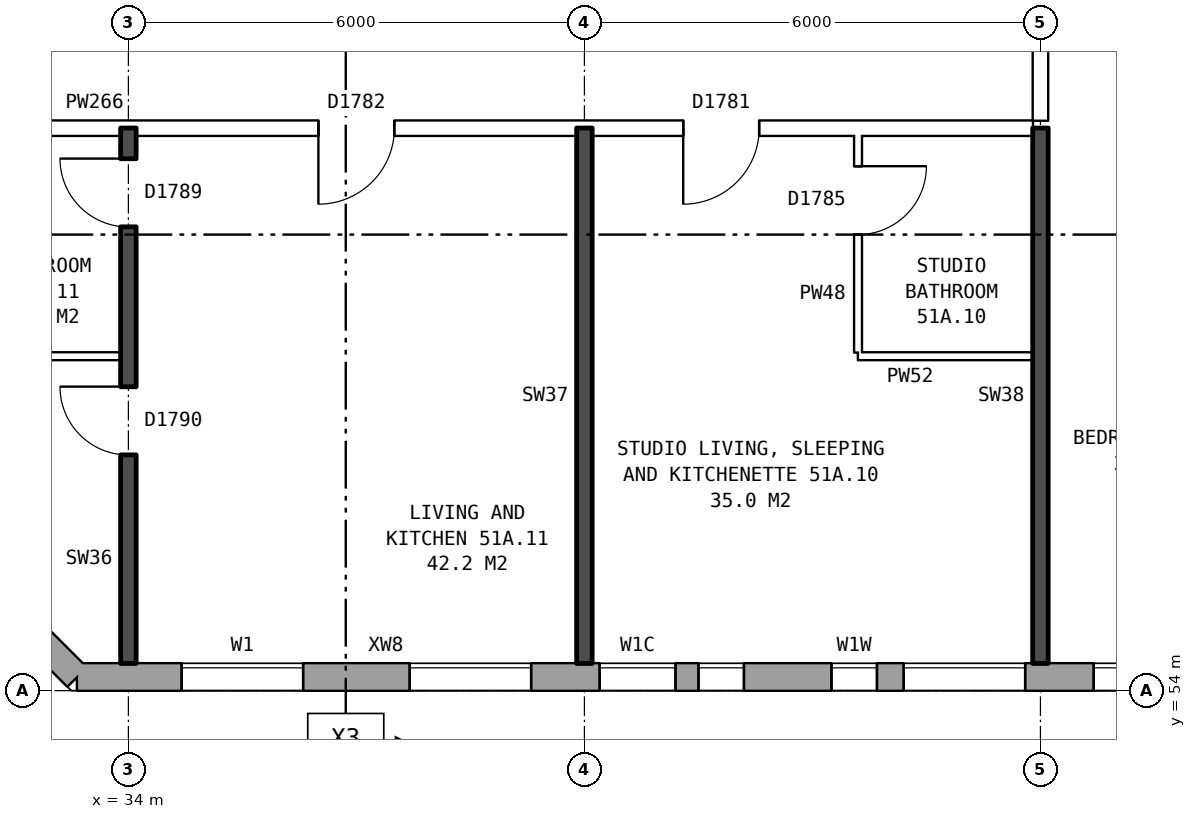
"""IFC4 building model, lengths in metres.
Left out: names, types, materials, properties, quantities, classifications, styles, units other than length and angle.
Written with IfcOpenShell. Run it as: python <this file> out.ifc"""

import sys

from ifc_helpers import new_model, si_unit, direction, frame, frame_2d, origin, place, context, subcontext, project, spatial, rectangle, extrude, element, fill, save


model = new_model("IFC4")
c1 = context("Model", 3, precision=1e-05, world=origin(), true_north=direction((0.0, 1.0)))
c2 = subcontext(c1, "Body", "Model", "MODEL_VIEW")
j1 = project(units=[si_unit("LENGTHUNIT", "METRE"), si_unit("PLANEANGLEUNIT", "RADIAN")], contexts=[c1])
p1 = place(None, origin())
s1 = spatial("IfcSite", under=j1, at=p1, CompositionType="ELEMENT")
p2 = place(p1, origin())
s2 = spatial("IfcBuilding", under=s1, at=p2, CompositionType="ELEMENT")
p3 = place(p2, frame((0.0, 0.0, 182.0)))
s3 = spatial("IfcBuildingStorey", under=s2, at=p3, CompositionType="ELEMENT", Elevation=182.0)
p4 = place(p3, frame((30.43, 57.075, 0.0), z_axis=(0.0, 0.0, 1.0), x_axis=(0.707106781187, -0.707106781187, 0.0)))
e1 = element("IfcWall", 1, at=p4, inside=s3, PredefinedType="STANDARD", context=c2, shape_type="SweptSolid", body=[
    extrude(rectangle(XDim=4.094, YDim=0.36, at=frame_2d((2.047, 0.0))), origin(), (0.0, 0.0, 1.0), 2.85),
])
p5 = place(p4, frame((1.247, 0.0, 0.8)))
e2 = element("IfcOpeningElement", 2, at=p5, cuts=e1, PredefinedType="OPENING", context=c2, shape_type="SweptSolid", body=[
    extrude(rectangle(XDim=1.6, YDim=1.8, at=frame_2d((0.8, 0.9))), frame((0.0, 0.19, 0.0), z_axis=(0.0, -1.0, 0.0), x_axis=(1.0, 0.0, 0.0)), (0.0, 0.0, 1.0), 0.38),
])
p6 = place(p3, frame((33.325, 54.18, 0.0), z_axis=(0.0, 0.0, 1.0), x_axis=(1.0, 0.0, 0.0)))
e3 = element("IfcWall", 3, at=p6, inside=s3, PredefinedType="STANDARD", context=c2, shape_type="SweptSolid", body=[
    extrude(rectangle(XDim=39.601, YDim=0.36, at=frame_2d((19.8, 0.0))), origin(), (0.0, 0.0, 1.0), 2.85),
])
p7 = place(p6, frame((1.375, 0.0, 0.8)))
e4 = element("IfcOpeningElement", 4, at=p7, cuts=e3, PredefinedType="OPENING", context=c2, shape_type="SweptSolid", body=[
    extrude(rectangle(XDim=1.6, YDim=1.8, at=frame_2d((0.8, 0.9))), frame((0.0, 0.19, 0.0), z_axis=(0.0, -1.0, 0.0), x_axis=(1.0, 0.0, 0.0)), (0.0, 0.0, 1.0), 0.38),
])
p8 = place(p6, frame((4.375, 0.0, 0.8)))
e5 = element("IfcOpeningElement", 5, at=p8, cuts=e3, PredefinedType="OPENING", context=c2, shape_type="SweptSolid", body=[
    extrude(rectangle(XDim=1.6, YDim=1.8, at=frame_2d((0.8, 0.9))), frame((0.0, 0.19, 0.0), z_axis=(0.0, -1.0, 0.0), x_axis=(1.0, 0.0, 0.0)), (0.0, 0.0, 1.0), 0.38),
])
p9 = place(p6, frame((6.875, 0.0, 0.8)))
e6 = element("IfcOpeningElement", 6, at=p9, cuts=e3, PredefinedType="OPENING", context=c2, shape_type="SweptSolid", body=[
    extrude(rectangle(XDim=1.0, YDim=1.8, at=frame_2d((0.5, 0.9))), frame((0.0, 0.19, 0.0), z_axis=(0.0, -1.0, 0.0), x_axis=(1.0, 0.0, 0.0)), (0.0, 0.0, 1.0), 0.38),
])
p10 = place(p6, frame((8.175, 0.0, 1.7)))
e7 = element("IfcOpeningElement", 7, at=p10, cuts=e3, PredefinedType="OPENING", context=c2, shape_type="SweptSolid", body=[
    extrude(rectangle(XDim=0.6, YDim=0.9, at=frame_2d((0.3, 0.45))), frame((0.0, 0.19, 0.0), z_axis=(0.0, -1.0, 0.0), x_axis=(1.0, 0.0, 0.0)), (0.0, 0.0, 1.0), 0.38),
])
p11 = place(p6, frame((13.375, 0.0, 0.8)))
e8 = element("IfcOpeningElement", 8, at=p11, cuts=e3, PredefinedType="OPENING", context=c2, shape_type="SweptSolid", body=[
    extrude(rectangle(XDim=1.6, YDim=1.8, at=frame_2d((0.8, 0.9))), frame((0.0, 0.19, 0.0), z_axis=(0.0, -1.0, 0.0), x_axis=(1.0, 0.0, 0.0)), (0.0, 0.0, 1.0), 0.38),
])
p12 = place(p6, frame((16.375, 0.0, 0.8)))
e9 = element("IfcOpeningElement", 9, at=p12, cuts=e3, PredefinedType="OPENING", context=c2, shape_type="SweptSolid", body=[
    extrude(rectangle(XDim=1.6, YDim=1.8, at=frame_2d((0.8, 0.9))), frame((0.0, 0.19, 0.0), z_axis=(0.0, -1.0, 0.0), x_axis=(1.0, 0.0, 0.0)), (0.0, 0.0, 1.0), 0.38),
])
p13 = place(p6, frame((19.375, 0.0, 0.8)))
e10 = element("IfcOpeningElement", 10, at=p13, cuts=e3, PredefinedType="OPENING", context=c2, shape_type="SweptSolid", body=[
    extrude(rectangle(XDim=1.6, YDim=1.8, at=frame_2d((0.8, 0.9))), frame((0.0, 0.19, 0.0), z_axis=(0.0, -1.0, 0.0), x_axis=(1.0, 0.0, 0.0)), (0.0, 0.0, 1.0), 0.38),
])
p14 = place(p6, frame((22.375, 0.0, 0.8)))
e11 = element("IfcOpeningElement", 11, at=p14, cuts=e3, PredefinedType="OPENING", context=c2, shape_type="SweptSolid", body=[
    extrude(rectangle(XDim=1.6, YDim=1.8, at=frame_2d((0.8, 0.9))), frame((0.0, 0.19, 0.0), z_axis=(0.0, -1.0, 0.0), x_axis=(1.0, 0.0, 0.0)), (0.0, 0.0, 1.0), 0.38),
])
p15 = place(p6, frame((25.375, 0.0, 0.8)))
e12 = element("IfcOpeningElement", 12, at=p15, cuts=e3, PredefinedType="OPENING", context=c2, shape_type="SweptSolid", body=[
    extrude(rectangle(XDim=1.6, YDim=1.8, at=frame_2d((0.8, 0.9))), frame((0.0, 0.19, 0.0), z_axis=(0.0, -1.0, 0.0), x_axis=(1.0, 0.0, 0.0)), (0.0, 0.0, 1.0), 0.38),
])
p16 = place(p6, frame((27.825, 0.0, 0.35)))
e13 = element("IfcOpeningElement", 13, at=p16, cuts=e3, PredefinedType="OPENING", context=c2, shape_type="SweptSolid", body=[
    extrude(rectangle(XDim=1.4, YDim=1.8, at=frame_2d((0.7, 0.9))), frame((0.0, 0.19, 0.0), z_axis=(0.0, -1.0, 0.0), x_axis=(1.0, 0.0, 0.0)), (0.0, 0.0, 1.0), 0.38),
])
p17 = place(p6, frame((31.375, 0.0, 0.8)))
e14 = element("IfcOpeningElement", 14, at=p17, cuts=e3, PredefinedType="OPENING", context=c2, shape_type="SweptSolid", body=[
    extrude(rectangle(XDim=1.6, YDim=1.8, at=frame_2d((0.8, 0.9))), frame((0.0, 0.19, 0.0), z_axis=(0.0, -1.0, 0.0), x_axis=(1.0, 0.0, 0.0)), (0.0, 0.0, 1.0), 0.38),
])
p18 = place(p6, frame((34.375, 0.0, 0.8)))
e15 = element("IfcOpeningElement", 15, at=p18, cuts=e3, PredefinedType="OPENING", context=c2, shape_type="SweptSolid", body=[
    extrude(rectangle(XDim=1.6, YDim=1.8, at=frame_2d((0.8, 0.9))), frame((0.0, 0.19, 0.0), z_axis=(0.0, -1.0, 0.0), x_axis=(1.0, 0.0, 0.0)), (0.0, 0.0, 1.0), 0.38),
])
p19 = place(p6, frame((37.375, 0.0, 0.8)))
e16 = element("IfcOpeningElement", 16, at=p19, cuts=e3, PredefinedType="OPENING", context=c2, shape_type="SweptSolid", body=[
    extrude(rectangle(XDim=1.6, YDim=1.8, at=frame_2d((0.8, 0.9))), frame((0.0, 0.19, 0.0), z_axis=(0.0, -1.0, 0.0), x_axis=(1.0, 0.0, 0.0)), (0.0, 0.0, 1.0), 0.38),
])
p20 = place(p6, frame((9.925, 0.0, 0.8)))
e17 = element("IfcOpeningElement", 17, at=p20, cuts=e3, PredefinedType="OPENING", context=c2, shape_type="SweptSolid", body=[
    extrude(rectangle(XDim=0.6, YDim=0.9, at=frame_2d((0.3, 0.45))), frame((0.0, 0.19, 0.0), z_axis=(0.0, -1.0, 0.0), x_axis=(1.0, 0.0, 0.0)), (0.0, 0.0, 1.0), 0.38),
])
p21 = place(p6, frame((10.875, 0.0, 0.8)))
e18 = element("IfcOpeningElement", 18, at=p21, cuts=e3, PredefinedType="OPENING", context=c2, shape_type="SweptSolid", body=[
    extrude(rectangle(XDim=1.6, YDim=1.8, at=frame_2d((0.8, 0.9))), frame((0.0, 0.19, 0.0), z_axis=(0.0, -1.0, 0.0), x_axis=(1.0, 0.0, 0.0)), (0.0, 0.0, 1.0), 0.38),
])
p22 = place(p6, frame((29.525, 0.0, 0.35)))
e19 = element("IfcOpeningElement", 19, at=p22, cuts=e3, PredefinedType="OPENING", context=c2, shape_type="SweptSolid", body=[
    extrude(rectangle(XDim=0.6, YDim=0.9, at=frame_2d((0.3, 0.45))), frame((0.0, 0.19, 0.0), z_axis=(0.0, -1.0, 0.0), x_axis=(1.0, 0.0, 0.0)), (0.0, 0.0, 1.0), 0.38),
])
p23 = place(p3, frame((31.91, 58.4, 0.0), z_axis=(0.0, 0.0, 1.0), x_axis=(1.0, 0.0, 0.0)))
e20 = element("IfcWall", 20, at=p23, inside=s3, PredefinedType="PARTITIONING", context=c2, shape_type="SweptSolid", body=[
    extrude(rectangle(XDim=1.99, YDim=0.1, at=frame_2d((0.995, 0.0))), origin(), (0.0, 0.0, 1.0), 2.85),
])
p24 = place(p3, frame((43.6, 58.4, 0.0), z_axis=(0.0, 0.0, 1.0), x_axis=(1.0, 0.0, 0.0)))
e21 = element("IfcWall", 21, at=p24, inside=s3, PredefinedType="PARTITIONING", context=c2, shape_type="SweptSolid", body=[
    extrude(rectangle(XDim=2.3, YDim=0.1, at=frame_2d((1.15, 0.0))), origin(), (0.0, 0.0, 1.0), 2.85),
])
p25 = place(p3, frame((30.61, 61.4, 0.0), z_axis=(0.0, 0.0, 1.0), x_axis=(1.0, 0.0, 0.0)))
e22 = element("IfcWall", 22, at=p25, inside=s3, PredefinedType="PARTITIONING", context=c2, shape_type="SweptSolid", body=[
    extrude(rectangle(XDim=15.29, YDim=0.2, at=frame_2d((7.645, 0.0))), origin(), (0.0, 0.0, 1.0), 2.85),
])
p26 = place(p25, frame((10.69, 0.0, 0.0)))
e23 = element("IfcOpeningElement", 23, at=p26, cuts=e22, PredefinedType="OPENING", context=c2, shape_type="SweptSolid", body=[
    extrude(rectangle(XDim=1.0, YDim=2.1, at=frame_2d((0.5, 1.05))), frame((0.0, 0.11, 0.0), z_axis=(0.0, -1.0, 0.0), x_axis=(1.0, 0.0, 0.0)), (0.0, 0.0, 1.0), 0.22),
])
p27 = place(p25, frame((5.89, 0.0, 0.0)))
e24 = element("IfcOpeningElement", 24, at=p27, cuts=e22, PredefinedType="OPENING", context=c2, shape_type="SweptSolid", body=[
    extrude(rectangle(XDim=1.0, YDim=2.1, at=frame_2d((0.5, 1.05))), frame((0.0, 0.11, 0.0), z_axis=(0.0, -1.0, 0.0), x_axis=(1.0, 0.0, 0.0)), (0.0, 0.0, 1.0), 0.22),
])
p28 = place(p3, frame((34.0, 54.36, 0.0), z_axis=(0.0, 0.0, 1.0), x_axis=(0.0, 1.0, 0.0)))
e25 = element("IfcWall", 25, at=p28, inside=s3, PredefinedType="SOLIDWALL", context=c2, shape_type="SweptSolid", body=[
    extrude(rectangle(XDim=7.04, YDim=0.2, at=frame_2d((3.52, 0.0))), origin(), (0.0, 0.0, 1.0), 2.85),
])
p29 = place(p28, frame((2.74, 0.0, 0.0)))
e26 = element("IfcOpeningElement", 26, at=p29, cuts=e25, PredefinedType="OPENING", context=c2, shape_type="SweptSolid", body=[
    extrude(rectangle(XDim=0.9, YDim=2.1, at=frame_2d((0.45, 1.05))), frame((0.0, 0.11, 0.0), z_axis=(0.0, -1.0, 0.0), x_axis=(1.0, 0.0, 0.0)), (0.0, 0.0, 1.0), 0.22),
])
p30 = place(p28, frame((5.74, 0.0, 0.0)))
e27 = element("IfcOpeningElement", 27, at=p30, cuts=e25, PredefinedType="OPENING", context=c2, shape_type="SweptSolid", body=[
    extrude(rectangle(XDim=0.9, YDim=2.1, at=frame_2d((0.45, 1.05))), frame((0.0, 0.11, 0.0), z_axis=(0.0, -1.0, 0.0), x_axis=(1.0, 0.0, 0.0)), (0.0, 0.0, 1.0), 0.22),
])
p31 = place(p3, frame((40.0, 54.36, 0.0), z_axis=(0.0, 0.0, 1.0), x_axis=(0.0, 1.0, 0.0)))
e28 = element("IfcWall", 28, at=p31, inside=s3, PredefinedType="SOLIDWALL", context=c2, shape_type="SweptSolid", body=[
    extrude(rectangle(XDim=7.04, YDim=0.2, at=frame_2d((3.52, 0.0))), origin(), (0.0, 0.0, 1.0), 2.85),
])
p32 = place(p3, frame((43.6, 58.45, 0.0), z_axis=(0.0, 0.0, 1.0), x_axis=(0.0, 1.0, 0.0)))
e29 = element("IfcWall", 29, at=p32, inside=s3, PredefinedType="PARTITIONING", context=c2, shape_type="SweptSolid", body=[
    extrude(rectangle(XDim=2.85, YDim=0.1, at=frame_2d((1.425, 0.0))), origin(), (0.0, 0.0, 1.0), 2.85),
])
p33 = place(p32, frame((1.55, 0.0, 0.0)))
e30 = element("IfcOpeningElement", 30, at=p33, cuts=e29, PredefinedType="OPENING", context=c2, shape_type="SweptSolid", body=[
    extrude(rectangle(XDim=0.9, YDim=2.1, at=frame_2d((0.45, 1.05))), frame((0.0, 0.06, 0.0), z_axis=(0.0, -1.0, 0.0), x_axis=(1.0, 0.0, 0.0)), (0.0, 0.0, 1.0), 0.12),
])
p34 = place(p3, frame((46.0, 54.36, 0.0), z_axis=(0.0, 0.0, 1.0), x_axis=(0.0, 1.0, 0.0)))
e31 = element("IfcWall", 31, at=p34, inside=s3, PredefinedType="SOLIDWALL", context=c2, shape_type="SweptSolid", body=[
    extrude(rectangle(XDim=7.04, YDim=0.2, at=frame_2d((3.52, 0.0))), origin(), (0.0, 0.0, 1.0), 2.85),
])
p35 = place(p3, frame((46.0, 61.5, 0.0), z_axis=(0.0, 0.0, 1.0), x_axis=(0.0, 1.0, 0.0)))
e32 = element("IfcWall", 32, at=p35, inside=s3, PredefinedType="PARTITIONING", context=c2, shape_type="SweptSolid", body=[
    extrude(rectangle(XDim=2.2, YDim=0.2, at=frame_2d((1.1, 0.0))), origin(), (0.0, 0.0, 1.0), 2.85),
])
p36 = place(p7, origin())
e33 = element("IfcWindow", 33, at=p36, inside=s3, PartitioningType="SINGLE_PANEL", PredefinedType="WINDOW", context=c2, shape_type="SweptSolid", body=[
    extrude(rectangle(XDim=1.6, YDim=1.8, at=frame_2d((0.8, 0.9))), frame((0.0, 0.15, 0.0), z_axis=(0.0, -1.0, 0.0), x_axis=(1.0, 0.0, 0.0)), (0.0, 0.0, 1.0), 0.06),
])
fill(e4, e33)
p37 = place(p8, origin())
e34 = element("IfcWindow", 34, at=p37, inside=s3, PartitioningType="SINGLE_PANEL", PredefinedType="WINDOW", context=c2, shape_type="SweptSolid", body=[
    extrude(rectangle(XDim=1.6, YDim=1.8, at=frame_2d((0.8, 0.9))), frame((0.0, 0.15, 0.0), z_axis=(0.0, -1.0, 0.0), x_axis=(1.0, 0.0, 0.0)), (0.0, 0.0, 1.0), 0.06),
])
fill(e5, e34)
p38 = place(p9, origin())
e35 = element("IfcWindow", 35, at=p38, inside=s3, PartitioningType="SINGLE_PANEL", PredefinedType="WINDOW", context=c2, shape_type="SweptSolid", body=[
    extrude(rectangle(XDim=1.0, YDim=1.8, at=frame_2d((0.5, 0.9))), frame((0.0, 0.15, 0.0), z_axis=(0.0, -1.0, 0.0), x_axis=(1.0, 0.0, 0.0)), (0.0, 0.0, 1.0), 0.06),
])
fill(e6, e35)
p39 = place(p10, origin())
e36 = element("IfcWindow", 36, at=p39, inside=s3, PartitioningType="SINGLE_PANEL", PredefinedType="WINDOW", context=c2, shape_type="SweptSolid", body=[
    extrude(rectangle(XDim=0.6, YDim=0.9, at=frame_2d((0.3, 0.45))), frame((0.0, 0.15, 0.0), z_axis=(0.0, -1.0, 0.0), x_axis=(1.0, 0.0, 0.0)), (0.0, 0.0, 1.0), 0.06),
])
fill(e7, e36)
p40 = place(p11, origin())
e37 = element("IfcWindow", 37, at=p40, inside=s3, PartitioningType="SINGLE_PANEL", PredefinedType="WINDOW", context=c2, shape_type="SweptSolid", body=[
    extrude(rectangle(XDim=1.6, YDim=1.8, at=frame_2d((0.8, 0.9))), frame((0.0, 0.15, 0.0), z_axis=(0.0, -1.0, 0.0), x_axis=(1.0, 0.0, 0.0)), (0.0, 0.0, 1.0), 0.06),
])
fill(e8, e37)
p41 = place(p26, frame((1.0, 0.0, 0.0), z_axis=(0.0, 0.0, 1.0), x_axis=(-1.0, 0.0, 0.0)))
e38 = element("IfcDoor", 38, at=p41, inside=s3, OperationType="SINGLE_SWING_RIGHT", PredefinedType="DOOR", context=c2, shape_type="SweptSolid", body=[
    extrude(rectangle(XDim=1.0, YDim=2.1, at=frame_2d((0.5, 1.05))), frame((0.0, 0.025, 0.0), z_axis=(0.0, -1.0, 0.0), x_axis=(1.0, 0.0, 0.0)), (0.0, 0.0, 1.0), 0.05),
])
fill(e23, e38)
p42 = place(p33, frame((0.9, 0.0, 0.0), z_axis=(0.0, 0.0, 1.0), x_axis=(-1.0, 0.0, 0.0)))
e39 = element("IfcDoor", 39, at=p42, inside=s3, OperationType="SINGLE_SWING_LEFT", PredefinedType="DOOR", context=c2, shape_type="SweptSolid", body=[
    extrude(rectangle(XDim=0.9, YDim=2.1, at=frame_2d((0.45, 1.05))), frame((0.0, 0.025, 0.0), z_axis=(0.0, -1.0, 0.0), x_axis=(1.0, 0.0, 0.0)), (0.0, 0.0, 1.0), 0.05),
])
fill(e30, e39)
p43 = place(p29, origin())
e40 = element("IfcDoor", 40, at=p43, inside=s3, OperationType="SINGLE_SWING_RIGHT", PredefinedType="DOOR", context=c2, shape_type="SweptSolid", body=[
    extrude(rectangle(XDim=0.9, YDim=2.1, at=frame_2d((0.45, 1.05))), frame((0.0, 0.025, 0.0), z_axis=(0.0, -1.0, 0.0), x_axis=(1.0, 0.0, 0.0)), (0.0, 0.0, 1.0), 0.05),
])
fill(e26, e40)
p44 = place(p27, frame((1.0, 0.0, 0.0), z_axis=(0.0, 0.0, 1.0), x_axis=(-1.0, 0.0, 0.0)))
e41 = element("IfcDoor", 41, at=p44, inside=s3, OperationType="SINGLE_SWING_RIGHT", PredefinedType="DOOR", context=c2, shape_type="SweptSolid", body=[
    extrude(rectangle(XDim=1.0, YDim=2.1, at=frame_2d((0.5, 1.05))), frame((0.0, 0.025, 0.0), z_axis=(0.0, -1.0, 0.0), x_axis=(1.0, 0.0, 0.0)), (0.0, 0.0, 1.0), 0.05),
])
fill(e24, e41)
p45 = place(p30, origin())
e42 = element("IfcDoor", 42, at=p45, inside=s3, OperationType="SINGLE_SWING_RIGHT", PredefinedType="DOOR", context=c2, shape_type="SweptSolid", body=[
    extrude(rectangle(XDim=0.9, YDim=2.1, at=frame_2d((0.45, 1.05))), frame((0.0, 0.025, 0.0), z_axis=(0.0, -1.0, 0.0), x_axis=(1.0, 0.0, 0.0)), (0.0, 0.0, 1.0), 0.05),
])
fill(e27, e42)
p46 = place(p20, origin())
e43 = element("IfcWindow", 43, at=p46, inside=s3, PartitioningType="SINGLE_PANEL", PredefinedType="WINDOW", context=c2, shape_type="SweptSolid", body=[
    extrude(rectangle(XDim=0.6, YDim=0.9, at=frame_2d((0.3, 0.45))), frame((0.0, 0.15, 0.0), z_axis=(0.0, -1.0, 0.0), x_axis=(1.0, 0.0, 0.0)), (0.0, 0.0, 1.0), 0.06),
])
fill(e17, e43)
p47 = place(p21, origin())
e44 = element("IfcWindow", 44, at=p47, inside=s3, PartitioningType="SINGLE_PANEL", PredefinedType="WINDOW", context=c2, shape_type="SweptSolid", body=[
    extrude(rectangle(XDim=1.6, YDim=1.8, at=frame_2d((0.8, 0.9))), frame((0.0, 0.15, 0.0), z_axis=(0.0, -1.0, 0.0), x_axis=(1.0, 0.0, 0.0)), (0.0, 0.0, 1.0), 0.06),
])
fill(e18, e44)
save(model, sys.argv[1])
